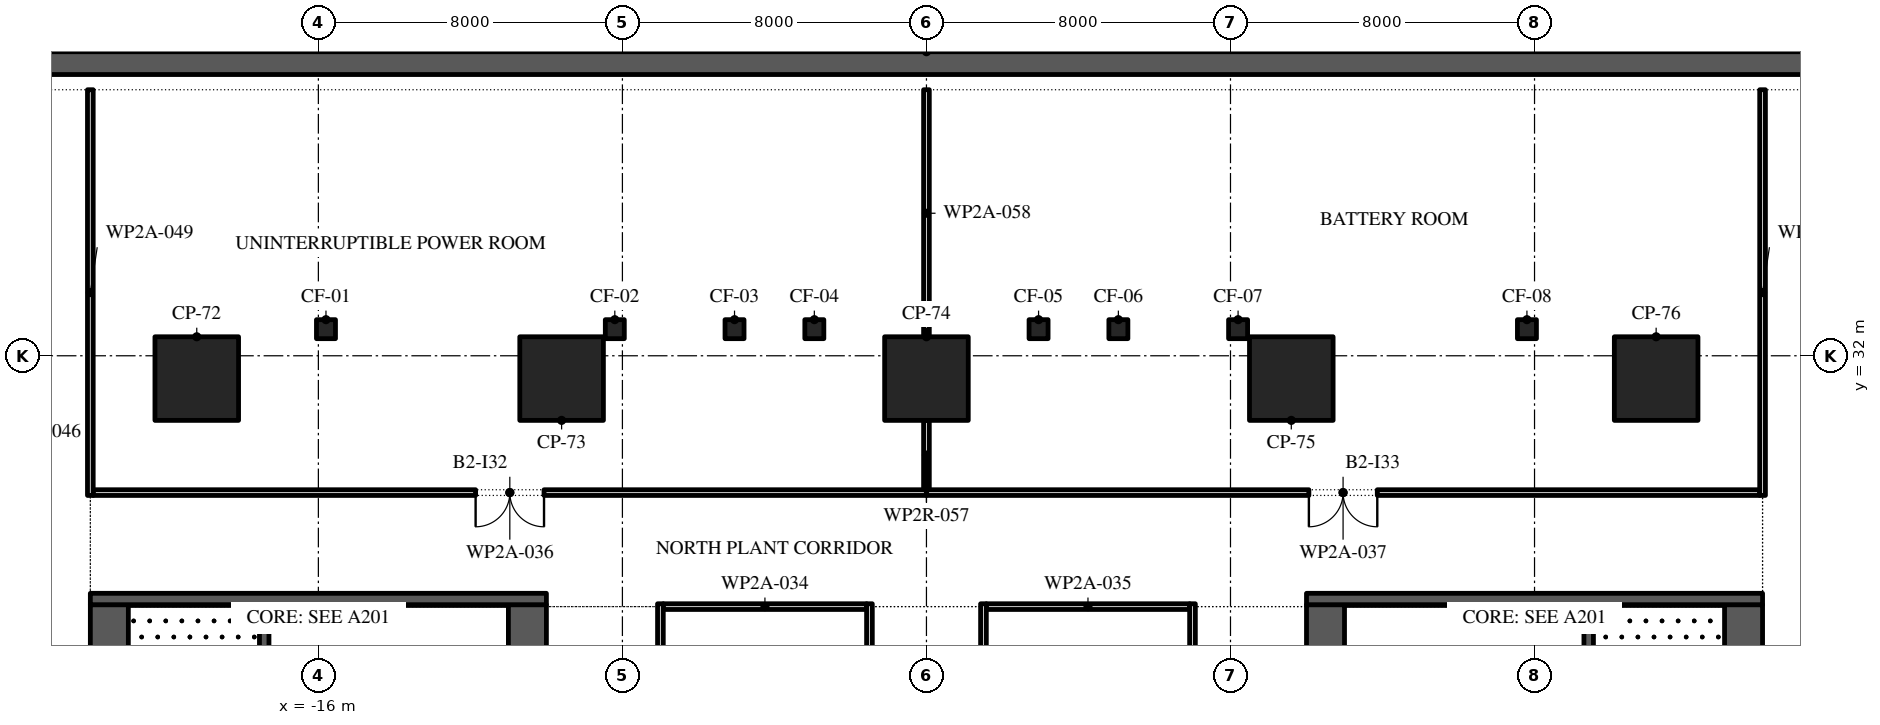
"""IFC4 building model, lengths in metres.
Left out: names, types, materials, properties, quantities, classifications, styles, units other than length and angle.
Written with IfcOpenShell. Run it as: python <this file> out.ifc"""

import sys

from ifc_helpers import new_model, si_unit, direction, frame, frame_2d, origin, origin_2d, place, context, subcontext, project, spatial, rectangle, extrude, element, fill, save


model = new_model("IFC4")
c1 = context("Model", 3, precision=1e-05, world=origin(), true_north=direction((0.0, 1.0)))
c2 = subcontext(c1, "Body", "Model", "MODEL_VIEW")
j1 = project(units=[si_unit("LENGTHUNIT", "METRE"), si_unit("PLANEANGLEUNIT", "RADIAN")], contexts=[c1])
p1 = place(None, origin())
s1 = spatial("IfcSite", under=j1, at=p1, CompositionType="ELEMENT")
p2 = place(p1, origin())
s2 = spatial("IfcBuilding", under=s1, at=p2, CompositionType="ELEMENT")
p3 = place(p2, frame((0.0, 0.0, -10.4)))
s3 = spatial("IfcBuildingStorey", under=s2, at=p3, CompositionType="ELEMENT", Elevation=-10.4)
p4 = place(p3, frame((-48.0, 39.7, -0.3), z_axis=(0.0, 0.0, 1.0), x_axis=(1.0, 0.0, 0.0)))
e1 = element("IfcWall", 1, at=p4, inside=s3, PredefinedType="SOLIDWALL", context=c2, shape_type="SweptSolid", body=[
    extrude(rectangle(XDim=96.0, YDim=0.6, at=frame_2d((48.0, 0.0))), origin(), (0.0, 0.0, 1.0), 5.5),
])
for number, where, z_axis, x_axis in (
    (2, (-15.8, 32.7, -0.3), (0.0, 0.0, 1.0), (1.0, 0.0, 0.0)),
    (3, (-8.2, 32.7, -0.3), (0.0, 0.0, 1.0), (1.0, 0.0, 0.0)),
    (4, (-5.05, 32.7, -0.3), (0.0, 0.0, 1.0), (1.0, 0.0, 0.0)),
    (5, (-2.95, 32.7, -0.3), (0.0, 0.0, 1.0), (1.0, 0.0, 0.0)),
    (6, (2.95, 32.7, -0.3), (0.0, 0.0, 1.0), (1.0, 0.0, 0.0)),
    (7, (5.05, 32.7, -0.3), (0.0, 0.0, 1.0), (1.0, 0.0, 0.0)),
    (8, (8.2, 32.7, -0.3), (0.0, 0.0, 1.0), (1.0, 0.0, 0.0)),
    (9, (15.8, 32.7, -0.3), (0.0, 0.0, 1.0), (1.0, 0.0, 0.0)),
):
    element("IfcColumn", number, at=place(p3, frame(where, z_axis=z_axis, x_axis=x_axis)), inside=s3, PredefinedType="COLUMN", context=c2, shape_type="SweptSolid", body=[
        extrude(rectangle(XDim=0.5, YDim=0.5, at=origin_2d()), origin(), (0.0, 0.0, 1.0), 5.5),
    ])
for number, where, z_axis, x_axis in (
    (10, (-19.2, 31.4, -0.3), (0.0, 0.0, 1.0), (1.0, 0.0, 0.0)),
    (11, (-9.6, 31.4, -0.3), (0.0, 0.0, 1.0), (1.0, 0.0, 0.0)),
    (12, (0.0, 31.4, -0.3), (0.0, 0.0, 1.0), (1.0, 0.0, 0.0)),
    (13, (9.6, 31.4, -0.3), (0.0, 0.0, 1.0), (1.0, 0.0, 0.0)),
    (14, (19.2, 31.4, -0.3), (0.0, 0.0, 1.0), (1.0, 0.0, 0.0)),
):
    element("IfcColumn", number, at=place(p3, frame(where, z_axis=z_axis, x_axis=x_axis)), inside=s3, PredefinedType="COLUMN", context=c2, shape_type="SweptSolid", body=[
        extrude(rectangle(XDim=2.2, YDim=2.2, at=origin_2d()), origin(), (0.0, 0.0, 1.0), 5.5),
    ])
p5 = place(p3, frame((-21.5, -2.45, 0.0), z_axis=(0.0, 0.0, 1.0), x_axis=(0.0, 1.0, 0.0)))
e15 = element("IfcWall", 15, at=p5, inside=s3, PredefinedType="SHEAR", context=c2, shape_type="SweptSolid", body=[
    extrude(rectangle(XDim=27.9, YDim=1.0, at=frame_2d((13.95, 0.0))), origin(), (0.0, 0.0, 1.0), 4.9),
])
p6 = place(p5, frame((5.05, 0.0, 0.0)))
e16 = element("IfcOpeningElement", 16, at=p6, cuts=e15, PredefinedType="OPENING", context=c2, shape_type="SweptSolid", body=[
    extrude(rectangle(XDim=1.2, YDim=2.1, at=frame_2d((0.6, 1.05))), frame((0.0, 0.51, 0.0), z_axis=(0.0, -1.0, 0.0), x_axis=(1.0, 0.0, 0.0)), (0.0, 0.0, 1.0), 1.02),
])
p7 = place(p5, frame((21.65, 0.0, 0.0)))
e17 = element("IfcOpeningElement", 17, at=p7, cuts=e15, PredefinedType="OPENING", context=c2, shape_type="SweptSolid", body=[
    extrude(rectangle(XDim=1.2, YDim=2.1, at=frame_2d((0.6, 1.05))), frame((0.0, 0.51, 0.0), z_axis=(0.0, -1.0, 0.0), x_axis=(1.0, 0.0, 0.0)), (0.0, 0.0, 1.0), 1.02),
])
p8 = place(p3, frame((-10.5, -2.45, 0.0), z_axis=(0.0, 0.0, 1.0), x_axis=(0.0, 1.0, 0.0)))
e18 = element("IfcWall", 18, at=p8, inside=s3, PredefinedType="SHEAR", context=c2, shape_type="SweptSolid", body=[
    extrude(rectangle(XDim=27.9, YDim=1.0, at=frame_2d((13.95, 0.0))), origin(), (0.0, 0.0, 1.0), 4.9),
])
p9 = place(p8, frame((23.65, 0.0, 0.0)))
e19 = element("IfcOpeningElement", 19, at=p9, cuts=e18, PredefinedType="OPENING", context=c2, shape_type="SweptSolid", body=[
    extrude(rectangle(XDim=2.4, YDim=2.1, at=frame_2d((1.2, 1.05))), frame((0.0, 0.51, 0.0), z_axis=(0.0, -1.0, 0.0), x_axis=(1.0, 0.0, 0.0)), (0.0, 0.0, 1.0), 1.02),
])
p10 = place(p8, frame((1.087, 0.0, 0.0)))
e20 = element("IfcOpeningElement", 20, at=p10, cuts=e18, PredefinedType="OPENING", context=c2, shape_type="SweptSolid", body=[
    extrude(rectangle(XDim=0.9, YDim=2.1, at=frame_2d((0.45, 1.05))), frame((0.0, 0.51, 0.0), z_axis=(0.0, -1.0, 0.0), x_axis=(1.0, 0.0, 0.0)), (0.0, 0.0, 1.0), 1.02),
])
p11 = place(p8, frame((4.262, 0.0, 0.0)))
e21 = element("IfcOpeningElement", 21, at=p11, cuts=e18, PredefinedType="OPENING", context=c2, shape_type="SweptSolid", body=[
    extrude(rectangle(XDim=1.0, YDim=2.1, at=frame_2d((0.5, 1.05))), frame((0.0, 0.51, 0.0), z_axis=(0.0, -1.0, 0.0), x_axis=(1.0, 0.0, 0.0)), (0.0, 0.0, 1.0), 1.02),
])
p12 = place(p3, frame((-22.0, 25.6, 0.0), z_axis=(0.0, 0.0, 1.0), x_axis=(1.0, 0.0, 0.0)))
e22 = element("IfcWall", 22, at=p12, inside=s3, PredefinedType="SHEAR", context=c2, shape_type="SweptSolid", body=[
    extrude(rectangle(XDim=12.0, YDim=0.3, at=frame_2d((6.0, 0.0))), origin(), (0.0, 0.0, 1.0), 4.9),
])
p13 = place(p3, frame((-17.425, 19.15, 0.0), z_axis=(0.0, 0.0, 1.0), x_axis=(0.0, 1.0, 0.0)))
e23 = element("IfcWall", 23, at=p13, inside=s3, PredefinedType="SHEAR", context=c2, shape_type="SweptSolid", body=[
    extrude(rectangle(XDim=6.3, YDim=0.25, at=frame_2d((3.15, 0.0))), origin(), (0.0, 0.0, 1.0), 4.9),
])
p14 = place(p13, frame((0.05, 0.0, 0.0)))
e24 = element("IfcOpeningElement", 24, at=p14, cuts=e23, PredefinedType="OPENING", context=c2, shape_type="SweptSolid", body=[
    extrude(rectangle(XDim=1.2, YDim=2.1, at=frame_2d((0.6, 1.05))), frame((0.0, 0.135, 0.0), z_axis=(0.0, -1.0, 0.0), x_axis=(1.0, 0.0, 0.0)), (0.0, 0.0, 1.0), 0.27),
])
p15 = place(p3, frame((21.5, -2.45, 0.0), z_axis=(0.0, 0.0, 1.0), x_axis=(0.0, 1.0, 0.0)))
e25 = element("IfcWall", 25, at=p15, inside=s3, PredefinedType="SHEAR", context=c2, shape_type="SweptSolid", body=[
    extrude(rectangle(XDim=27.9, YDim=1.0, at=frame_2d((13.95, 0.0))), origin(), (0.0, 0.0, 1.0), 4.9),
])
p16 = place(p15, frame((5.05, 0.0, 0.0)))
e26 = element("IfcOpeningElement", 26, at=p16, cuts=e25, PredefinedType="OPENING", context=c2, shape_type="SweptSolid", body=[
    extrude(rectangle(XDim=1.2, YDim=2.1, at=frame_2d((0.6, 1.05))), frame((0.0, 0.51, 0.0), z_axis=(0.0, -1.0, 0.0), x_axis=(1.0, 0.0, 0.0)), (0.0, 0.0, 1.0), 1.02),
])
p17 = place(p15, frame((21.65, 0.0, 0.0)))
e27 = element("IfcOpeningElement", 27, at=p17, cuts=e25, PredefinedType="OPENING", context=c2, shape_type="SweptSolid", body=[
    extrude(rectangle(XDim=1.2, YDim=2.1, at=frame_2d((0.6, 1.05))), frame((0.0, 0.51, 0.0), z_axis=(0.0, -1.0, 0.0), x_axis=(1.0, 0.0, 0.0)), (0.0, 0.0, 1.0), 1.02),
])
p18 = place(p3, frame((10.5, -2.45, 0.0), z_axis=(0.0, 0.0, 1.0), x_axis=(0.0, 1.0, 0.0)))
e28 = element("IfcWall", 28, at=p18, inside=s3, PredefinedType="SHEAR", context=c2, shape_type="SweptSolid", body=[
    extrude(rectangle(XDim=27.9, YDim=1.0, at=frame_2d((13.95, 0.0))), origin(), (0.0, 0.0, 1.0), 4.9),
])
p19 = place(p18, frame((23.65, 0.0, 0.0)))
e29 = element("IfcOpeningElement", 29, at=p19, cuts=e28, PredefinedType="OPENING", context=c2, shape_type="SweptSolid", body=[
    extrude(rectangle(XDim=2.4, YDim=2.1, at=frame_2d((1.2, 1.05))), frame((0.0, 0.51, 0.0), z_axis=(0.0, -1.0, 0.0), x_axis=(1.0, 0.0, 0.0)), (0.0, 0.0, 1.0), 1.02),
])
p20 = place(p18, frame((1.087, 0.0, 0.0)))
e30 = element("IfcOpeningElement", 30, at=p20, cuts=e28, PredefinedType="OPENING", context=c2, shape_type="SweptSolid", body=[
    extrude(rectangle(XDim=0.9, YDim=2.1, at=frame_2d((0.45, 1.05))), frame((0.0, 0.51, 0.0), z_axis=(0.0, -1.0, 0.0), x_axis=(1.0, 0.0, 0.0)), (0.0, 0.0, 1.0), 1.02),
])
p21 = place(p18, frame((4.262, 0.0, 0.0)))
e31 = element("IfcOpeningElement", 31, at=p21, cuts=e28, PredefinedType="OPENING", context=c2, shape_type="SweptSolid", body=[
    extrude(rectangle(XDim=1.0, YDim=2.1, at=frame_2d((0.5, 1.05))), frame((0.0, 0.51, 0.0), z_axis=(0.0, -1.0, 0.0), x_axis=(1.0, 0.0, 0.0)), (0.0, 0.0, 1.0), 1.02),
])
p22 = place(p3, frame((10.0, 25.6, 0.0), z_axis=(0.0, 0.0, 1.0), x_axis=(1.0, 0.0, 0.0)))
e32 = element("IfcWall", 32, at=p22, inside=s3, PredefinedType="SHEAR", context=c2, shape_type="SweptSolid", body=[
    extrude(rectangle(XDim=12.0, YDim=0.3, at=frame_2d((6.0, 0.0))), origin(), (0.0, 0.0, 1.0), 4.9),
])
p23 = place(p3, frame((17.425, 19.15, 0.0), z_axis=(0.0, 0.0, 1.0), x_axis=(0.0, 1.0, 0.0)))
e33 = element("IfcWall", 33, at=p23, inside=s3, PredefinedType="SHEAR", context=c2, shape_type="SweptSolid", body=[
    extrude(rectangle(XDim=6.3, YDim=0.25, at=frame_2d((3.15, 0.0))), origin(), (0.0, 0.0, 1.0), 4.9),
])
p24 = place(p23, frame((0.05, 0.0, 0.0)))
e34 = element("IfcOpeningElement", 34, at=p24, cuts=e33, PredefinedType="OPENING", context=c2, shape_type="SweptSolid", body=[
    extrude(rectangle(XDim=1.2, YDim=2.1, at=frame_2d((0.6, 1.05))), frame((0.0, 0.135, 0.0), z_axis=(0.0, -1.0, 0.0), x_axis=(1.0, 0.0, 0.0)), (0.0, 0.0, 1.0), 0.27),
])
for number, where, z_axis, x_axis in (
    (35, (-6.925, 25.4, 0.0), (0.0, 0.0, 1.0), (1.0, 0.0, 0.0)),
    (36, (1.575, 25.4, 0.0), (0.0, 0.0, 1.0), (1.0, 0.0, 0.0)),
):
    element("IfcWall", number, at=place(p3, frame(where, z_axis=z_axis, x_axis=x_axis)), inside=s3, PredefinedType="PARTITIONING", context=c2, shape_type="SweptSolid", body=[
        extrude(rectangle(XDim=5.35, YDim=0.15, at=frame_2d((2.675, 0.0))), origin(), (0.0, 0.0, 1.0), 4.9),
    ])
p25 = place(p3, frame((-21.925, 28.4, 0.0), z_axis=(0.0, 0.0, 1.0), x_axis=(1.0, 0.0, 0.0)))
e37 = element("IfcWall", 37, at=p25, inside=s3, PredefinedType="PARTITIONING", context=c2, shape_type="SweptSolid", body=[
    extrude(rectangle(XDim=21.925, YDim=0.15, at=frame_2d((10.962, 0.0))), origin(), (0.0, 0.0, 1.0), 4.9),
])
p26 = place(p25, frame((10.062, 0.0, 0.0)))
e38 = element("IfcOpeningElement", 38, at=p26, cuts=e37, PredefinedType="OPENING", context=c2, shape_type="SweptSolid", body=[
    extrude(rectangle(XDim=1.8, YDim=2.1, at=frame_2d((0.9, 1.05))), frame((0.0, 0.085, 0.0), z_axis=(0.0, -1.0, 0.0), x_axis=(1.0, 0.0, 0.0)), (0.0, 0.0, 1.0), 0.17),
])
p27 = place(p3, frame((0.0, 28.4, 0.0), z_axis=(0.0, 0.0, 1.0), x_axis=(1.0, 0.0, 0.0)))
e39 = element("IfcWall", 39, at=p27, inside=s3, PredefinedType="PARTITIONING", context=c2, shape_type="SweptSolid", body=[
    extrude(rectangle(XDim=21.925, YDim=0.15, at=frame_2d((10.962, 0.0))), origin(), (0.0, 0.0, 1.0), 4.9),
])
p28 = place(p27, frame((10.062, 0.0, 0.0)))
e40 = element("IfcOpeningElement", 40, at=p28, cuts=e39, PredefinedType="OPENING", context=c2, shape_type="SweptSolid", body=[
    extrude(rectangle(XDim=1.8, YDim=2.1, at=frame_2d((0.9, 1.05))), frame((0.0, 0.085, 0.0), z_axis=(0.0, -1.0, 0.0), x_axis=(1.0, 0.0, 0.0)), (0.0, 0.0, 1.0), 0.17),
])
p29 = place(p3, frame((-22.0, 28.325, 0.0), z_axis=(0.0, 0.0, 1.0), x_axis=(0.0, 1.0, 0.0)))
e41 = element("IfcWall", 41, at=p29, inside=s3, PredefinedType="PARTITIONING", context=c2, shape_type="SweptSolid", body=[
    extrude(rectangle(XDim=10.675, YDim=0.15, at=frame_2d((5.337, 0.0))), origin(), (0.0, 0.0, 1.0), 4.9),
])
p30 = place(p3, frame((-7.0, -4.075, 0.0), z_axis=(0.0, 0.0, 1.0), x_axis=(0.0, 1.0, 0.0)))
e42 = element("IfcWall", 42, at=p30, inside=s3, PredefinedType="PARTITIONING", context=c2, shape_type="SweptSolid", body=[
    extrude(rectangle(XDim=29.55, YDim=0.15, at=frame_2d((14.775, 0.0))), origin(), (0.0, 0.0, 1.0), 4.9),
])
p31 = place(p3, frame((-1.5, -9.0, 0.0), z_axis=(0.0, 0.0, 1.0), x_axis=(0.0, 1.0, 0.0)))
e43 = element("IfcWall", 43, at=p31, inside=s3, PredefinedType="PARTITIONING", context=c2, shape_type="SweptSolid", body=[
    extrude(rectangle(XDim=34.475, YDim=0.15, at=frame_2d((17.238, 0.0))), origin(), (0.0, 0.0, 1.0), 4.9),
])
p32 = place(p31, frame((16.337, 0.0, 0.0)))
e44 = element("IfcOpeningElement", 44, at=p32, cuts=e43, PredefinedType="OPENING", context=c2, shape_type="SweptSolid", body=[
    extrude(rectangle(XDim=1.8, YDim=2.1, at=frame_2d((0.9, 1.05))), frame((0.0, 0.085, 0.0), z_axis=(0.0, -1.0, 0.0), x_axis=(1.0, 0.0, 0.0)), (0.0, 0.0, 1.0), 0.17),
])
p33 = place(p3, frame((0.0, 28.475, 0.0), z_axis=(0.0, 0.0, 1.0), x_axis=(0.0, 1.0, 0.0)))
e45 = element("IfcWall", 45, at=p33, inside=s3, PredefinedType="PARTITIONING", context=c2, shape_type="SweptSolid", body=[
    extrude(rectangle(XDim=1.825, YDim=0.15, at=frame_2d((0.913, 0.0))), origin(), (0.0, 0.0, 1.0), 4.59),
])
p34 = place(p3, frame((0.0, 32.5, 0.0), z_axis=(0.0, 0.0, 1.0), x_axis=(0.0, 1.0, 0.0)))
e46 = element("IfcWall", 46, at=p34, inside=s3, PredefinedType="PARTITIONING", context=c2, shape_type="SweptSolid", body=[
    extrude(rectangle(XDim=6.5, YDim=0.15, at=frame_2d((3.25, 0.0))), origin(), (0.0, 0.0, 1.0), 4.9),
])
p35 = place(p3, frame((1.5, -7.0, 0.0), z_axis=(0.0, 0.0, 1.0), x_axis=(0.0, 1.0, 0.0)))
e47 = element("IfcWall", 47, at=p35, inside=s3, PredefinedType="PARTITIONING", context=c2, shape_type="SweptSolid", body=[
    extrude(rectangle(XDim=32.475, YDim=0.15, at=frame_2d((16.238, 0.0))), origin(), (0.0, 0.0, 1.0), 4.9),
])
p36 = place(p3, frame((7.0, -4.075, 0.0), z_axis=(0.0, 0.0, 1.0), x_axis=(0.0, 1.0, 0.0)))
e48 = element("IfcWall", 48, at=p36, inside=s3, PredefinedType="PARTITIONING", context=c2, shape_type="SweptSolid", body=[
    extrude(rectangle(XDim=29.55, YDim=0.15, at=frame_2d((14.775, 0.0))), origin(), (0.0, 0.0, 1.0), 4.9),
])
p37 = place(p36, frame((13.875, 0.0, 0.0)))
e49 = element("IfcOpeningElement", 49, at=p37, cuts=e48, PredefinedType="OPENING", context=c2, shape_type="SweptSolid", body=[
    extrude(rectangle(XDim=1.8, YDim=2.1, at=frame_2d((0.9, 1.05))), frame((0.0, 0.085, 0.0), z_axis=(0.0, -1.0, 0.0), x_axis=(1.0, 0.0, 0.0)), (0.0, 0.0, 1.0), 0.17),
])
p38 = place(p3, frame((22.0, 28.325, 0.0), z_axis=(0.0, 0.0, 1.0), x_axis=(0.0, 1.0, 0.0)))
e50 = element("IfcWall", 50, at=p38, inside=s3, PredefinedType="PARTITIONING", context=c2, shape_type="SweptSolid", body=[
    extrude(rectangle(XDim=10.675, YDim=0.15, at=frame_2d((5.337, 0.0))), origin(), (0.0, 0.0, 1.0), 4.9),
])
p39 = place(p26, frame((1.8, 0.0, 0.0), z_axis=(0.0, 0.0, 1.0), x_axis=(-1.0, 0.0, 0.0)))
e51 = element("IfcDoor", 51, at=p39, inside=s3, OperationType="SINGLE_SWING_LEFT", PredefinedType="DOOR", context=c2, shape_type="SweptSolid", body=[
    extrude(rectangle(XDim=1.8, YDim=2.1, at=frame_2d((0.9, 1.05))), frame((0.0, 0.025, 0.0), z_axis=(0.0, -1.0, 0.0), x_axis=(1.0, 0.0, 0.0)), (0.0, 0.0, 1.0), 0.05),
])
fill(e38, e51)
p40 = place(p28, frame((1.8, 0.0, 0.0), z_axis=(0.0, 0.0, 1.0), x_axis=(-1.0, 0.0, 0.0)))
e52 = element("IfcDoor", 52, at=p40, inside=s3, OperationType="SINGLE_SWING_LEFT", PredefinedType="DOOR", context=c2, shape_type="SweptSolid", body=[
    extrude(rectangle(XDim=1.8, YDim=2.1, at=frame_2d((0.9, 1.05))), frame((0.0, 0.025, 0.0), z_axis=(0.0, -1.0, 0.0), x_axis=(1.0, 0.0, 0.0)), (0.0, 0.0, 1.0), 0.05),
])
fill(e40, e52)
save(model, sys.argv[1])
